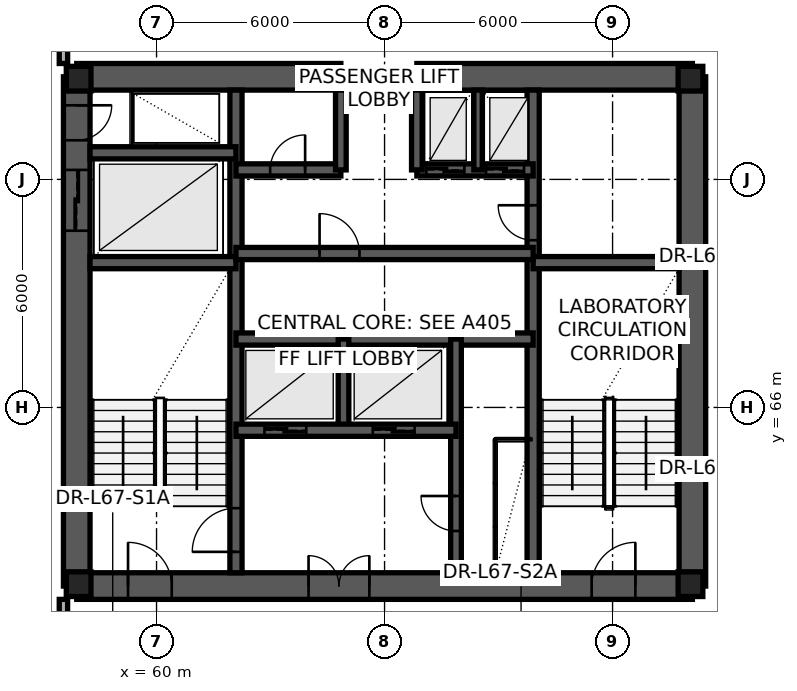
"""IFC4 building model, lengths in metres.
Left out: names, types, materials, properties, quantities, classifications, styles, units other than length and angle.
Written with IfcOpenShell. Run it as: python <this file> out.ifc"""

import sys

from ifc_helpers import new_model, si_unit, direction, frame, frame_2d, origin, origin_2d, place, context, subcontext, project, spatial, rectangle, extrude, element, fill, save


model = new_model("IFC4")
c1 = context("Model", 3, precision=1e-05, world=origin(), true_north=direction((0.0, 1.0)))
c2 = subcontext(c1, "Body", "Model", "MODEL_VIEW")
j1 = project(units=[si_unit("LENGTHUNIT", "METRE"), si_unit("PLANEANGLEUNIT", "RADIAN")], contexts=[c1])
p1 = place(None, origin())
s1 = spatial("IfcSite", under=j1, at=p1, CompositionType="ELEMENT")
p2 = place(p1, origin())
s2 = spatial("IfcBuilding", under=s1, at=p2, CompositionType="ELEMENT")
p3 = place(p2, frame((0.0, 0.0, 253.5)))
s3 = spatial("IfcBuildingStorey", under=s2, at=p3, CompositionType="ELEMENT", Elevation=253.5)
p4 = place(p3, frame((57.9, 61.3, 0.0), z_axis=(0.0, 0.0, 1.0), x_axis=(1.0, 0.0, 0.0)))
e1 = element("IfcWall", 1, at=p4, inside=s3, PredefinedType="SHEAR", context=c2, shape_type="SweptSolid", body=[
    extrude(rectangle(XDim=16.2, YDim=0.7, at=frame_2d((8.1, 0.0))), origin(), (0.0, 0.0, 1.0), 3.65),
])
p5 = place(p4, frame((1.35, 0.0, 0.0)))
e2 = element("IfcOpeningElement", 2, at=p5, cuts=e1, PredefinedType="OPENING", context=c2, shape_type="SweptSolid", body=[
    extrude(rectangle(XDim=1.15, YDim=2.15, at=frame_2d((0.575, 1.075))), frame((0.0, 0.36, 0.0), z_axis=(0.0, -1.0, 0.0), x_axis=(1.0, 0.0, 0.0)), (0.0, 0.0, 1.0), 0.72),
])
p6 = place(p4, frame((6.1, 0.0, 0.0)))
e3 = element("IfcOpeningElement", 3, at=p6, cuts=e1, PredefinedType="OPENING", context=c2, shape_type="SweptSolid", body=[
    extrude(rectangle(XDim=1.6, YDim=2.15, at=frame_2d((0.8, 1.075))), frame((0.0, 0.36, 0.0), z_axis=(0.0, -1.0, 0.0), x_axis=(1.0, 0.0, 0.0)), (0.0, 0.0, 1.0), 0.72),
])
p7 = place(p4, frame((13.55, 0.0, 0.0)))
e4 = element("IfcOpeningElement", 4, at=p7, cuts=e1, PredefinedType="OPENING", context=c2, shape_type="SweptSolid", body=[
    extrude(rectangle(XDim=1.15, YDim=2.15, at=frame_2d((0.575, 1.075))), frame((0.0, 0.36, 0.0), z_axis=(0.0, -1.0, 0.0), x_axis=(1.0, 0.0, 0.0)), (0.0, 0.0, 1.0), 0.72),
])
p8 = place(p3, frame((74.1, 61.3, 0.0), z_axis=(0.0, 0.0, 1.0), x_axis=(0.0, 1.0, 0.0)))
e5 = element("IfcWall", 5, at=p8, inside=s3, PredefinedType="SHEAR", context=c2, shape_type="SweptSolid", body=[
    extrude(rectangle(XDim=13.4, YDim=0.7, at=frame_2d((6.7, 0.0))), origin(), (0.0, 0.0, 1.0), 3.65),
])
p9 = place(p3, frame((74.1, 74.7, 0.0), z_axis=(0.0, 0.0, 1.0), x_axis=(-1.0, 0.0, 0.0)))
e6 = element("IfcWall", 6, at=p9, inside=s3, PredefinedType="SHEAR", context=c2, shape_type="SweptSolid", body=[
    extrude(rectangle(XDim=7.25, YDim=0.7, at=frame_2d((3.625, 0.0))), origin(), (0.0, 0.0, 1.0), 3.65),
])
p10 = place(p3, frame((64.85, 74.7, 0.0), z_axis=(0.0, 0.0, 1.0), x_axis=(-1.0, 0.0, 0.0)))
e7 = element("IfcWall", 7, at=p10, inside=s3, PredefinedType="SHEAR", context=c2, shape_type="SweptSolid", body=[
    extrude(rectangle(XDim=6.95, YDim=0.7, at=frame_2d((3.475, 0.0))), origin(), (0.0, 0.0, 1.0), 3.65),
])
p11 = place(p3, frame((57.9, 74.7, 0.0), z_axis=(0.0, 0.0, 1.0), x_axis=(0.0, -1.0, 0.0)))
e8 = element("IfcWall", 8, at=p11, inside=s3, PredefinedType="SHEAR", context=c2, shape_type="SweptSolid", body=[
    extrude(rectangle(XDim=13.4, YDim=0.7, at=frame_2d((6.7, 0.0))), origin(), (0.0, 0.0, 1.0), 3.65),
])
p12 = place(p11, frame((0.75, 0.0, 0.0)))
e9 = element("IfcOpeningElement", 9, at=p12, cuts=e8, PredefinedType="OPENING", context=c2, shape_type="SweptSolid", body=[
    extrude(rectangle(XDim=0.92, YDim=2.05, at=frame_2d((0.46, 1.025))), frame((0.0, 0.36, 0.0), z_axis=(0.0, -1.0, 0.0), x_axis=(1.0, 0.0, 0.0)), (0.0, 0.0, 1.0), 0.72),
])
p13 = place(p11, frame((2.45, 0.0, 0.0)))
e10 = element("IfcOpeningElement", 10, at=p13, cuts=e8, PredefinedType="OPENING", context=c2, shape_type="SweptSolid", body=[
    extrude(rectangle(XDim=1.6, YDim=2.3, at=frame_2d((0.8, 1.15))), frame((0.0, 0.36, 0.0), z_axis=(0.0, -1.0, 0.0), x_axis=(1.0, 0.0, 0.0)), (0.0, 0.0, 1.0), 0.72),
])
p14 = place(p3, frame((62.09, 61.65, 0.0), z_axis=(0.0, 0.0, 1.0), x_axis=(0.0, 1.0, 0.0)))
e11 = element("IfcWall", 11, at=p14, inside=s3, PredefinedType="SHEAR", context=c2, shape_type="SweptSolid", body=[
    extrude(rectangle(XDim=12.7, YDim=0.32, at=frame_2d((6.35, 0.0))), origin(), (0.0, 0.0, 1.0), 3.65),
])
p15 = place(p14, frame((0.55, 0.0, 0.0)))
e12 = element("IfcOpeningElement", 12, at=p15, cuts=e11, PredefinedType="OPENING", context=c2, shape_type="SweptSolid", body=[
    extrude(rectangle(XDim=1.15, YDim=2.15, at=frame_2d((0.575, 1.075))), frame((0.0, 0.17, 0.0), z_axis=(0.0, -1.0, 0.0), x_axis=(1.0, 0.0, 0.0)), (0.0, 0.0, 1.0), 0.34),
])
p16 = place(p3, frame((69.91, 61.65, 0.0), z_axis=(0.0, 0.0, 1.0), x_axis=(0.0, 1.0, 0.0)))
e13 = element("IfcWall", 13, at=p16, inside=s3, PredefinedType="SHEAR", context=c2, shape_type="SweptSolid", body=[
    extrude(rectangle(XDim=12.7, YDim=0.32, at=frame_2d((6.35, 0.0))), origin(), (0.0, 0.0, 1.0), 3.65),
])
p17 = place(p16, frame((8.75, 0.0, 0.0)))
e14 = element("IfcOpeningElement", 14, at=p17, cuts=e13, PredefinedType="OPENING", context=c2, shape_type="SweptSolid", body=[
    extrude(rectangle(XDim=0.92, YDim=2.05, at=frame_2d((0.46, 1.025))), frame((0.0, 0.17, 0.0), z_axis=(0.0, -1.0, 0.0), x_axis=(1.0, 0.0, 0.0)), (0.0, 0.0, 1.0), 0.34),
])
for number, where, z_axis, x_axis in (
    (15, (58.25, 69.81, 0.0), (0.0, 0.0, 1.0), (1.0, 0.0, 0.0)),
    (16, (69.91, 69.81, 0.0), (0.0, 0.0, 1.0), (1.0, 0.0, 0.0)),
    (17, (58.25, 72.7, 0.0), (0.0, 0.0, 1.0), (1.0, 0.0, 0.0)),
):
    element("IfcWall", number, at=place(p3, frame(where, z_axis=z_axis, x_axis=x_axis)), inside=s3, PredefinedType="SHEAR", context=c2, shape_type="SweptSolid", body=[
        extrude(rectangle(XDim=3.84, YDim=0.32, at=frame_2d((1.92, 0.0))), origin(), (0.0, 0.0, 1.0), 3.65),
    ])
p18 = place(p3, frame((62.09, 67.8, 0.0), z_axis=(0.0, 0.0, 1.0), x_axis=(1.0, 0.0, 0.0)))
e18 = element("IfcWall", 18, at=p18, inside=s3, PredefinedType="SHEAR", context=c2, shape_type="SweptSolid", body=[
    extrude(rectangle(XDim=7.82, YDim=0.32, at=frame_2d((3.91, 0.0))), origin(), (0.0, 0.0, 1.0), 3.65),
])
p19 = place(p3, frame((64.92, 65.4, 0.0), z_axis=(0.0, 0.0, 1.0), x_axis=(0.0, 1.0, 0.0)))
e19 = element("IfcWall", 19, at=p19, inside=s3, PredefinedType="SHEAR", context=c2, shape_type="SweptSolid", body=[
    extrude(rectangle(XDim=2.4, YDim=0.28, at=frame_2d((1.2, 0.0))), origin(), (0.0, 0.0, 1.0), 3.65),
])
p20 = place(p3, frame((62.09, 70.05, 0.0), z_axis=(0.0, 0.0, 1.0), x_axis=(1.0, 0.0, 0.0)))
e20 = element("IfcWall", 20, at=p20, inside=s3, PredefinedType="SHEAR", context=c2, shape_type="SweptSolid", body=[
    extrude(rectangle(XDim=7.82, YDim=0.32, at=frame_2d((3.91, 0.0))), origin(), (0.0, 0.0, 1.0), 3.65),
])
p21 = place(p20, frame((2.2, 0.0, 0.0)))
e21 = element("IfcOpeningElement", 21, at=p21, cuts=e20, PredefinedType="OPENING", context=c2, shape_type="SweptSolid", body=[
    extrude(rectangle(XDim=1.05, YDim=2.15, at=frame_2d((0.525, 1.075))), frame((0.0, 0.17, 0.0), z_axis=(0.0, -1.0, 0.0), x_axis=(1.0, 0.0, 0.0)), (0.0, 0.0, 1.0), 0.34),
])
p22 = place(p3, frame((62.09, 72.25, 0.0), z_axis=(0.0, 0.0, 1.0), x_axis=(1.0, 0.0, 0.0)))
e22 = element("IfcWall", 22, at=p22, inside=s3, PredefinedType="SHEAR", context=c2, shape_type="SweptSolid", body=[
    extrude(rectangle(XDim=2.76, YDim=0.32, at=frame_2d((1.38, 0.0))), origin(), (0.0, 0.0, 1.0), 3.65),
])
p23 = place(p22, frame((0.9, 0.0, 0.0)))
e23 = element("IfcOpeningElement", 23, at=p23, cuts=e22, PredefinedType="OPENING", context=c2, shape_type="SweptSolid", body=[
    extrude(rectangle(XDim=0.92, YDim=2.05, at=frame_2d((0.46, 1.025))), frame((0.0, 0.17, 0.0), z_axis=(0.0, -1.0, 0.0), x_axis=(1.0, 0.0, 0.0)), (0.0, 0.0, 1.0), 0.34),
])
p24 = place(p3, frame((66.85, 72.25, 0.0), z_axis=(0.0, 0.0, 1.0), x_axis=(1.0, 0.0, 0.0)))
e24 = element("IfcWall", 24, at=p24, inside=s3, PredefinedType="SHEAR", context=c2, shape_type="SweptSolid", body=[
    extrude(rectangle(XDim=3.06, YDim=0.32, at=frame_2d((1.53, 0.0))), origin(), (0.0, 0.0, 1.0), 3.65),
])
p25 = place(p24, frame((0.25, 0.0, 0.0)))
e25 = element("IfcOpeningElement", 25, at=p25, cuts=e24, PredefinedType="OPENING", context=c2, shape_type="SweptSolid", body=[
    extrude(rectangle(XDim=1.0, YDim=2.2, at=frame_2d((0.5, 1.1))), frame((0.0, 0.17, 0.0), z_axis=(0.0, -1.0, 0.0), x_axis=(1.0, 0.0, 0.0)), (0.0, 0.0, 1.0), 0.34),
])
p26 = place(p24, frame((1.82, 0.0, 0.0)))
e26 = element("IfcOpeningElement", 26, at=p26, cuts=e24, PredefinedType="OPENING", context=c2, shape_type="SweptSolid", body=[
    extrude(rectangle(XDim=1.0, YDim=2.2, at=frame_2d((0.5, 1.1))), frame((0.0, 0.17, 0.0), z_axis=(0.0, -1.0, 0.0), x_axis=(1.0, 0.0, 0.0)), (0.0, 0.0, 1.0), 0.34),
])
for number, where, z_axis, x_axis in (
    (27, (64.85, 72.25, 0.0), (0.0, 0.0, 1.0), (0.0, 1.0, 0.0)),
    (28, (66.85, 72.25, 0.0), (0.0, 0.0, 1.0), (0.0, 1.0, 0.0)),
):
    element("IfcWall", number, at=place(p3, frame(where, z_axis=z_axis, x_axis=x_axis)), inside=s3, PredefinedType="SHEAR", context=c2, shape_type="SweptSolid", body=[
        extrude(rectangle(XDim=2.1, YDim=0.28, at=frame_2d((1.05, 0.0))), origin(), (0.0, 0.0, 1.0), 3.65),
    ])
p27 = place(p3, frame((68.46, 72.25, 0.0), z_axis=(0.0, 0.0, 1.0), x_axis=(0.0, 1.0, 0.0)))
e29 = element("IfcWall", 29, at=p27, inside=s3, PredefinedType="SHEAR", context=c2, shape_type="SweptSolid", body=[
    extrude(rectangle(XDim=2.1, YDim=0.22, at=frame_2d((1.05, 0.0))), origin(), (0.0, 0.0, 1.0), 3.65),
])
p28 = place(p3, frame((67.88, 61.65, 0.0), z_axis=(0.0, 0.0, 1.0), x_axis=(0.0, 1.0, 0.0)))
e30 = element("IfcWall", 30, at=p28, inside=s3, PredefinedType="SHEAR", context=c2, shape_type="SweptSolid", body=[
    extrude(rectangle(XDim=6.15, YDim=0.28, at=frame_2d((3.075, 0.0))), origin(), (0.0, 0.0, 1.0), 3.65),
])
p29 = place(p28, frame((1.1, 0.0, 0.0)))
e31 = element("IfcOpeningElement", 31, at=p29, cuts=e30, PredefinedType="OPENING", context=c2, shape_type="SweptSolid", body=[
    extrude(rectangle(XDim=0.92, YDim=2.05, at=frame_2d((0.46, 1.025))), frame((0.0, 0.15, 0.0), z_axis=(0.0, -1.0, 0.0), x_axis=(1.0, 0.0, 0.0)), (0.0, 0.0, 1.0), 0.3),
])
p30 = place(p3, frame((62.09, 65.4, 0.0), z_axis=(0.0, 0.0, 1.0), x_axis=(1.0, 0.0, 0.0)))
e32 = element("IfcWall", 32, at=p30, inside=s3, PredefinedType="SHEAR", context=c2, shape_type="SweptSolid", body=[
    extrude(rectangle(XDim=5.79, YDim=0.32, at=frame_2d((2.895, 0.0))), origin(), (0.0, 0.0, 1.0), 3.65),
])
p31 = place(p30, frame((0.75, 0.0, 0.0)))
e33 = element("IfcOpeningElement", 33, at=p31, cuts=e32, PredefinedType="OPENING", context=c2, shape_type="SweptSolid", body=[
    extrude(rectangle(XDim=1.1, YDim=2.2, at=frame_2d((0.55, 1.1))), frame((0.0, 0.17, 0.0), z_axis=(0.0, -1.0, 0.0), x_axis=(1.0, 0.0, 0.0)), (0.0, 0.0, 1.0), 0.34),
])
p32 = place(p30, frame((3.6, 0.0, 0.0)))
e34 = element("IfcOpeningElement", 34, at=p32, cuts=e32, PredefinedType="OPENING", context=c2, shape_type="SweptSolid", body=[
    extrude(rectangle(XDim=1.1, YDim=2.2, at=frame_2d((0.55, 1.1))), frame((0.0, 0.17, 0.0), z_axis=(0.0, -1.0, 0.0), x_axis=(1.0, 0.0, 0.0)), (0.0, 0.0, 1.0), 0.34),
])
for number, where, z_axis, x_axis in (
    (35, (57.95, 61.35, 0.0), (0.0, 0.0, 1.0), (1.0, 0.0, 0.0)),
    (36, (74.05, 61.35, 0.0), (0.0, 0.0, 1.0), (1.0, 0.0, 0.0)),
    (37, (74.05, 74.65, 0.0), (0.0, 0.0, 1.0), (1.0, 0.0, 0.0)),
    (38, (57.95, 74.65, 0.0), (0.0, 0.0, 1.0), (1.0, 0.0, 0.0)),
):
    element("IfcColumn", number, at=place(p3, frame(where, z_axis=z_axis, x_axis=x_axis)), inside=s3, PredefinedType="COLUMN", context=c2, shape_type="SweptSolid", body=[
        extrude(rectangle(XDim=0.65, YDim=0.65, at=origin_2d()), origin(), (0.0, 0.0, 1.0), 3.65),
    ])
p33 = place(p3, frame((61.229, 35.702, 0.0), z_axis=(0.0, 0.0, 1.0), x_axis=(-0.397532587454, 0.917588056762, 0.0)))
e39 = element("IfcWall", 39, at=p33, inside=s3, PredefinedType="STANDARD", context=c2, shape_type="SweptSolid", body=[
    extrude(rectangle(XDim=46.043, YDim=0.34, at=frame_2d((23.021, 0.0))), origin(), (0.0, 0.0, 1.0), 0.85),
])
p34 = place(p3, frame((57.55, 75.05, 0.0), z_axis=(0.0, 0.0, 1.0), x_axis=(0.0, 1.0, 0.0)))
e40 = element("IfcWall", 40, at=p34, inside=s3, PredefinedType="PARTITIONING", context=c2, shape_type="SweptSolid", body=[
    extrude(rectangle(XDim=10.083, YDim=0.22, at=frame_2d((5.042, 0.0))), origin(), (0.0, 0.0, 1.0), 2.68),
])
p35 = place(p34, frame((0.56, 0.0, 0.0)))
e41 = element("IfcOpeningElement", 41, at=p35, cuts=e40, PredefinedType="OPENING", context=c2, shape_type="SweptSolid", body=[
    extrude(rectangle(XDim=1.0, YDim=2.1, at=frame_2d((0.5, 1.05))), frame((0.0, 0.12, 0.0), z_axis=(0.0, -1.0, 0.0), x_axis=(1.0, 0.0, 0.0)), (0.0, 0.0, 1.0), 0.24),
])
p36 = place(p3, frame((57.55, 59.53, 0.0), z_axis=(0.0, 0.0, 1.0), x_axis=(0.0, 1.0, 0.0)))
e42 = element("IfcWall", 42, at=p36, inside=s3, PredefinedType="PARTITIONING", context=c2, shape_type="SweptSolid", body=[
    extrude(rectangle(XDim=1.42, YDim=0.22, at=frame_2d((0.71, 0.0))), origin(), (0.0, 0.0, 1.0), 2.83),
])
p37 = place(p15, origin())
e43 = element("IfcDoor", 43, at=p37, inside=s3, OperationType="SINGLE_SWING_LEFT", PredefinedType="DOOR", context=c2, shape_type="SweptSolid", body=[
    extrude(rectangle(XDim=1.15, YDim=2.15, at=frame_2d((0.575, 1.075))), frame((0.0, 0.025, 0.0), z_axis=(0.0, -1.0, 0.0), x_axis=(1.0, 0.0, 0.0)), (0.0, 0.0, 1.0), 0.05),
])
fill(e12, e43)
p38 = place(p29, origin())
e44 = element("IfcDoor", 44, at=p38, inside=s3, OperationType="SINGLE_SWING_RIGHT", PredefinedType="DOOR", context=c2, shape_type="SweptSolid", body=[
    extrude(rectangle(XDim=0.92, YDim=2.05, at=frame_2d((0.46, 1.025))), frame((0.0, 0.025, 0.0), z_axis=(0.0, -1.0, 0.0), x_axis=(1.0, 0.0, 0.0)), (0.0, 0.0, 1.0), 0.05),
])
fill(e31, e44)
p39 = place(p31, origin())
e45 = element("IfcDoor", 45, at=p39, inside=s3, OperationType="SLIDING_TO_LEFT", PredefinedType="DOOR", context=c2, shape_type="SweptSolid", body=[
    extrude(rectangle(XDim=1.1, YDim=2.2, at=frame_2d((0.55, 1.1))), frame((0.0, 0.025, 0.0), z_axis=(0.0, -1.0, 0.0), x_axis=(1.0, 0.0, 0.0)), (0.0, 0.0, 1.0), 0.05),
])
fill(e33, e45)
p40 = place(p32, origin())
e46 = element("IfcDoor", 46, at=p40, inside=s3, OperationType="SLIDING_TO_LEFT", PredefinedType="DOOR", context=c2, shape_type="SweptSolid", body=[
    extrude(rectangle(XDim=1.1, YDim=2.2, at=frame_2d((0.55, 1.1))), frame((0.0, 0.025, 0.0), z_axis=(0.0, -1.0, 0.0), x_axis=(1.0, 0.0, 0.0)), (0.0, 0.0, 1.0), 0.05),
])
fill(e34, e46)
p41 = place(p21, origin())
e47 = element("IfcDoor", 47, at=p41, inside=s3, OperationType="SINGLE_SWING_LEFT", PredefinedType="DOOR", context=c2, shape_type="SweptSolid", body=[
    extrude(rectangle(XDim=1.05, YDim=2.15, at=frame_2d((0.525, 1.075))), frame((0.0, 0.025, 0.0), z_axis=(0.0, -1.0, 0.0), x_axis=(1.0, 0.0, 0.0)), (0.0, 0.0, 1.0), 0.05),
])
fill(e21, e47)
p42 = place(p23, origin())
e48 = element("IfcDoor", 48, at=p42, inside=s3, OperationType="SINGLE_SWING_RIGHT", PredefinedType="DOOR", context=c2, shape_type="SweptSolid", body=[
    extrude(rectangle(XDim=0.92, YDim=2.05, at=frame_2d((0.46, 1.025))), frame((0.0, 0.025, 0.0), z_axis=(0.0, -1.0, 0.0), x_axis=(1.0, 0.0, 0.0)), (0.0, 0.0, 1.0), 0.05),
])
fill(e23, e48)
p43 = place(p25, origin())
e49 = element("IfcDoor", 49, at=p43, inside=s3, OperationType="SLIDING_TO_LEFT", PredefinedType="DOOR", context=c2, shape_type="SweptSolid", body=[
    extrude(rectangle(XDim=1.0, YDim=2.2, at=frame_2d((0.5, 1.1))), frame((0.0, 0.025, 0.0), z_axis=(0.0, -1.0, 0.0), x_axis=(1.0, 0.0, 0.0)), (0.0, 0.0, 1.0), 0.05),
])
fill(e25, e49)
p44 = place(p26, origin())
e50 = element("IfcDoor", 50, at=p44, inside=s3, OperationType="SLIDING_TO_LEFT", PredefinedType="DOOR", context=c2, shape_type="SweptSolid", body=[
    extrude(rectangle(XDim=1.0, YDim=2.2, at=frame_2d((0.5, 1.1))), frame((0.0, 0.025, 0.0), z_axis=(0.0, -1.0, 0.0), x_axis=(1.0, 0.0, 0.0)), (0.0, 0.0, 1.0), 0.05),
])
fill(e26, e50)
p45 = place(p5, origin())
e51 = element("IfcDoor", 51, at=p45, inside=s3, OperationType="SINGLE_SWING_LEFT", PredefinedType="DOOR", context=c2, shape_type="SweptSolid", body=[
    extrude(rectangle(XDim=1.15, YDim=2.15, at=frame_2d((0.575, 1.075))), frame((0.0, 0.025, 0.0), z_axis=(0.0, -1.0, 0.0), x_axis=(1.0, 0.0, 0.0)), (0.0, 0.0, 1.0), 0.05),
])
fill(e2, e51)
p46 = place(p6, origin())
e52 = element("IfcDoor", 52, at=p46, inside=s3, OperationType="DOUBLE_DOOR_SINGLE_SWING", PredefinedType="DOOR", context=c2, shape_type="SweptSolid", body=[
    extrude(rectangle(XDim=1.6, YDim=2.15, at=frame_2d((0.8, 1.075))), frame((0.0, 0.025, 0.0), z_axis=(0.0, -1.0, 0.0), x_axis=(1.0, 0.0, 0.0)), (0.0, 0.0, 1.0), 0.05),
])
fill(e3, e52)
p47 = place(p7, origin())
e53 = element("IfcDoor", 53, at=p47, inside=s3, OperationType="SINGLE_SWING_RIGHT", PredefinedType="DOOR", context=c2, shape_type="SweptSolid", body=[
    extrude(rectangle(XDim=1.15, YDim=2.15, at=frame_2d((0.575, 1.075))), frame((0.0, 0.025, 0.0), z_axis=(0.0, -1.0, 0.0), x_axis=(1.0, 0.0, 0.0)), (0.0, 0.0, 1.0), 0.05),
])
fill(e4, e53)
p48 = place(p12, origin())
e54 = element("IfcDoor", 54, at=p48, inside=s3, OperationType="SINGLE_SWING_LEFT", PredefinedType="DOOR", context=c2, shape_type="SweptSolid", body=[
    extrude(rectangle(XDim=0.92, YDim=2.05, at=frame_2d((0.46, 1.025))), frame((0.0, 0.025, 0.0), z_axis=(0.0, -1.0, 0.0), x_axis=(1.0, 0.0, 0.0)), (0.0, 0.0, 1.0), 0.05),
])
fill(e9, e54)
p49 = place(p13, origin())
e55 = element("IfcDoor", 55, at=p49, inside=s3, OperationType="DOUBLE_DOOR_SLIDING", PredefinedType="DOOR", context=c2, shape_type="SweptSolid", body=[
    extrude(rectangle(XDim=1.6, YDim=2.3, at=frame_2d((0.8, 1.15))), frame((0.0, 0.025, 0.0), z_axis=(0.0, -1.0, 0.0), x_axis=(1.0, 0.0, 0.0)), (0.0, 0.0, 1.0), 0.05),
])
fill(e10, e55)
p50 = place(p17, origin())
e56 = element("IfcDoor", 56, at=p50, inside=s3, OperationType="SINGLE_SWING_RIGHT", PredefinedType="DOOR", context=c2, shape_type="SweptSolid", body=[
    extrude(rectangle(XDim=0.92, YDim=2.05, at=frame_2d((0.46, 1.025))), frame((0.0, 0.025, 0.0), z_axis=(0.0, -1.0, 0.0), x_axis=(1.0, 0.0, 0.0)), (0.0, 0.0, 1.0), 0.05),
])
fill(e14, e56)
save(model, sys.argv[1])
